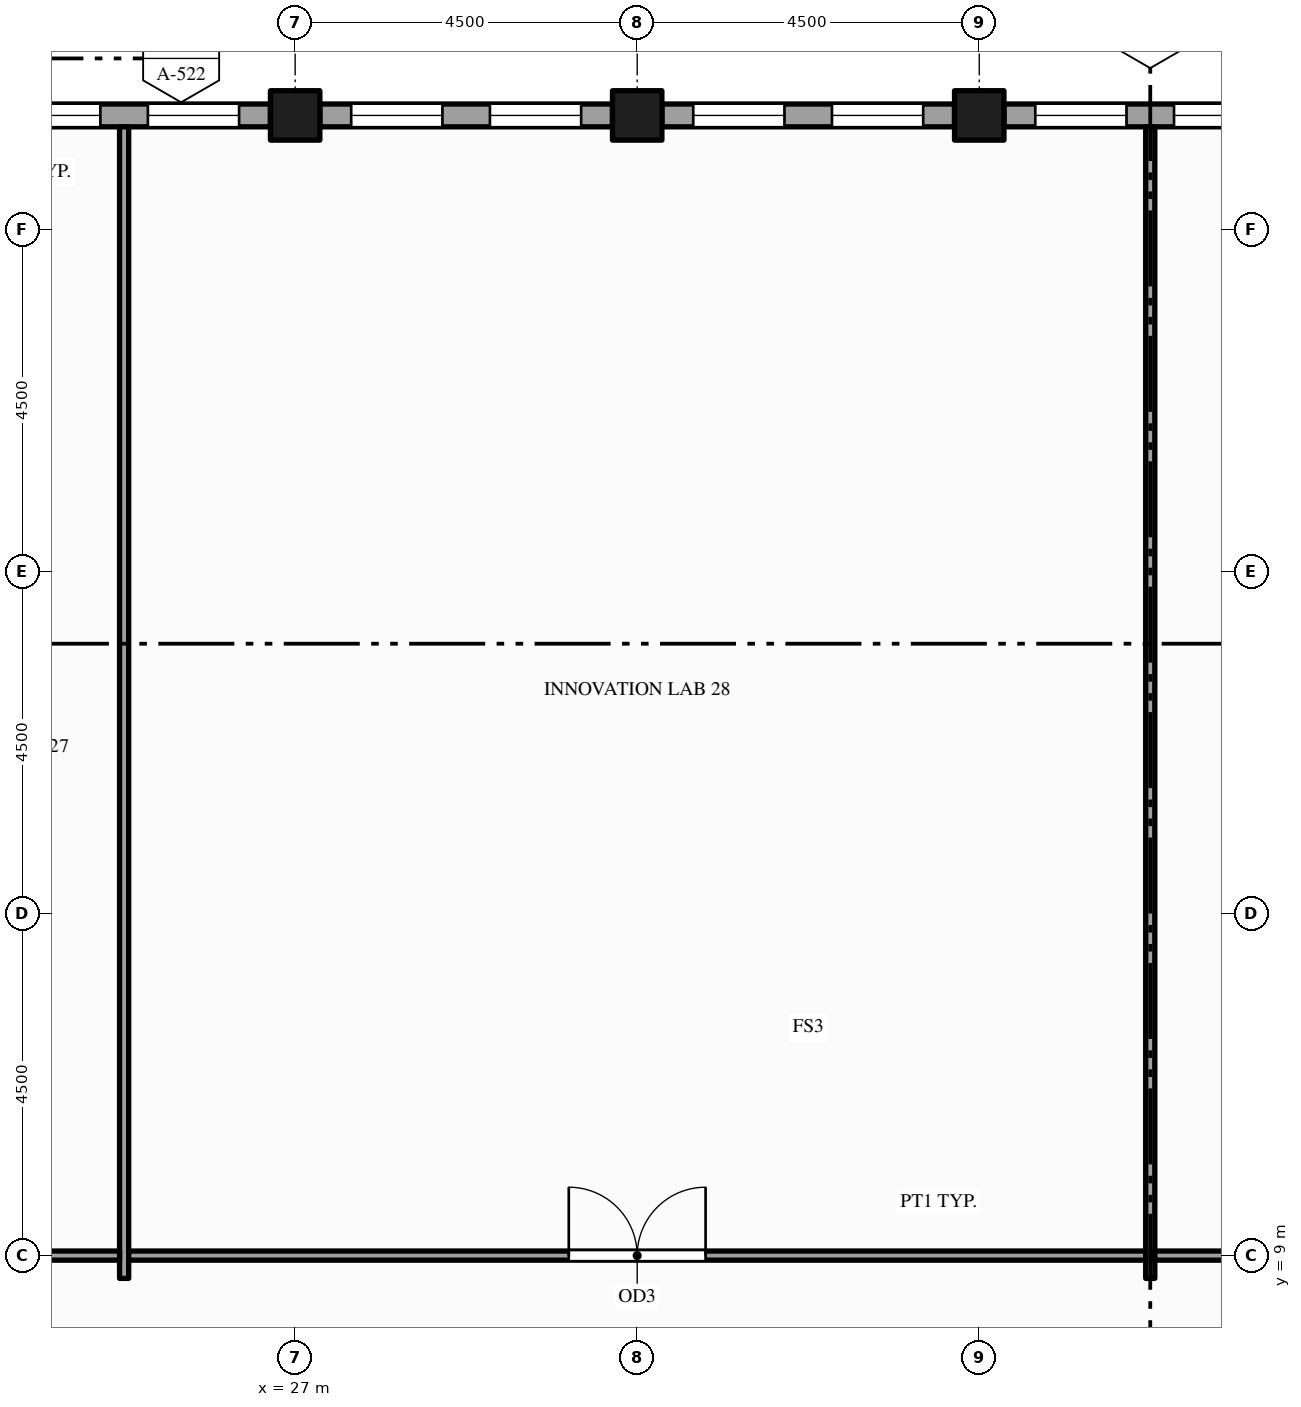
"""IFC4 building model, lengths in metres.
Left out: names, types, materials, properties, quantities, classifications, styles, units other than length and angle.
Written with IfcOpenShell. Run it as: python <this file> out.ifc"""

import sys

from ifc_helpers import new_model, si_unit, direction, frame, frame_2d, origin, origin_2d, place, context, subcontext, project, spatial, rectangle, hollow_rectangle, extrude, element, fill, save


model = new_model("IFC4")
c1 = context("Model", 3, precision=1e-05, world=origin(), true_north=direction((0.0, 1.0)))
c2 = subcontext(c1, "Body", "Model", "MODEL_VIEW")
j1 = project(units=[si_unit("LENGTHUNIT", "METRE"), si_unit("PLANEANGLEUNIT", "RADIAN")], contexts=[c1])
p1 = place(None, origin())
s1 = spatial("IfcSite", under=j1, at=p1, CompositionType="ELEMENT")
p2 = place(p1, origin())
s2 = spatial("IfcBuilding", under=s1, at=p2, CompositionType="ELEMENT")
p3 = place(p2, frame((0.0, 0.0, 273.0)))
s3 = spatial("IfcBuildingStorey", under=s2, at=p3, CompositionType="ELEMENT", Elevation=273.0)
for number, where, z_axis, x_axis in (
    (1, (27.0, 24.0, -0.15), (0.0, 0.0, 1.0), (1.0, 0.0, 0.0)),
    (2, (31.5, 24.0, -0.15), (0.0, 0.0, 1.0), (1.0, 0.0, 0.0)),
    (3, (36.0, 24.0, -0.15), (0.0, 0.0, 1.0), (1.0, 0.0, 0.0)),
):
    element("IfcColumn", number, at=place(p3, frame(where, z_axis=z_axis, x_axis=x_axis)), inside=s3, PredefinedType="COLUMN", context=c2, shape_type="SweptSolid", body=[
        extrude(hollow_rectangle(XDim=0.65, YDim=0.65, WallThickness=0.032, at=origin_2d()), origin(), (0.0, 0.0, 1.0), 4.0),
    ])
p4 = place(p3, frame((40.175, 24.0, 0.0), z_axis=(0.0, 0.0, 1.0), x_axis=(-1.0, 0.0, 0.0)))
e4 = element("IfcWall", 4, at=p4, inside=s3, PredefinedType="STANDARD", context=c2, shape_type="SweptSolid", body=[
    extrude(rectangle(XDim=3.85, YDim=0.3, at=frame_2d((1.925, 0.0))), origin(), (0.0, 0.0, 1.0), 2.87),
])
p5 = place(p4, frame((0.413, 0.0, 0.9)))
e5 = element("IfcOpeningElement", 5, at=p5, cuts=e4, PredefinedType="OPENING", context=c2, shape_type="SweptSolid", body=[
    extrude(rectangle(XDim=1.2, YDim=1.75, at=frame_2d((0.6, 0.875))), frame((0.0, 0.16, 0.0), z_axis=(0.0, -1.0, 0.0), x_axis=(1.0, 0.0, 0.0)), (0.0, 0.0, 1.0), 0.32),
])
p6 = place(p4, frame((2.238, 0.0, 0.9)))
e6 = element("IfcOpeningElement", 6, at=p6, cuts=e4, PredefinedType="OPENING", context=c2, shape_type="SweptSolid", body=[
    extrude(rectangle(XDim=1.2, YDim=1.75, at=frame_2d((0.6, 0.875))), frame((0.0, 0.16, 0.0), z_axis=(0.0, -1.0, 0.0), x_axis=(1.0, 0.0, 0.0)), (0.0, 0.0, 1.0), 0.32),
])
p7 = place(p3, frame((35.675, 24.0, 0.0), z_axis=(0.0, 0.0, 1.0), x_axis=(-1.0, 0.0, 0.0)))
e7 = element("IfcWall", 7, at=p7, inside=s3, PredefinedType="STANDARD", context=c2, shape_type="SweptSolid", body=[
    extrude(rectangle(XDim=3.85, YDim=0.3, at=frame_2d((1.925, 0.0))), origin(), (0.0, 0.0, 1.0), 2.87),
])
p8 = place(p7, frame((0.413, 0.0, 0.9)))
e8 = element("IfcOpeningElement", 8, at=p8, cuts=e7, PredefinedType="OPENING", context=c2, shape_type="SweptSolid", body=[
    extrude(rectangle(XDim=1.2, YDim=1.75, at=frame_2d((0.6, 0.875))), frame((0.0, 0.16, 0.0), z_axis=(0.0, -1.0, 0.0), x_axis=(1.0, 0.0, 0.0)), (0.0, 0.0, 1.0), 0.32),
])
p9 = place(p7, frame((2.238, 0.0, 0.9)))
e9 = element("IfcOpeningElement", 9, at=p9, cuts=e7, PredefinedType="OPENING", context=c2, shape_type="SweptSolid", body=[
    extrude(rectangle(XDim=1.2, YDim=1.75, at=frame_2d((0.6, 0.875))), frame((0.0, 0.16, 0.0), z_axis=(0.0, -1.0, 0.0), x_axis=(1.0, 0.0, 0.0)), (0.0, 0.0, 1.0), 0.32),
])
p10 = place(p3, frame((31.175, 24.0, 0.0), z_axis=(0.0, 0.0, 1.0), x_axis=(-1.0, 0.0, 0.0)))
e10 = element("IfcWall", 10, at=p10, inside=s3, PredefinedType="STANDARD", context=c2, shape_type="SweptSolid", body=[
    extrude(rectangle(XDim=3.85, YDim=0.3, at=frame_2d((1.925, 0.0))), origin(), (0.0, 0.0, 1.0), 2.87),
])
p11 = place(p10, frame((0.413, 0.0, 0.9)))
e11 = element("IfcOpeningElement", 11, at=p11, cuts=e10, PredefinedType="OPENING", context=c2, shape_type="SweptSolid", body=[
    extrude(rectangle(XDim=1.2, YDim=1.75, at=frame_2d((0.6, 0.875))), frame((0.0, 0.16, 0.0), z_axis=(0.0, -1.0, 0.0), x_axis=(1.0, 0.0, 0.0)), (0.0, 0.0, 1.0), 0.32),
])
p12 = place(p10, frame((2.238, 0.0, 0.9)))
e12 = element("IfcOpeningElement", 12, at=p12, cuts=e10, PredefinedType="OPENING", context=c2, shape_type="SweptSolid", body=[
    extrude(rectangle(XDim=1.2, YDim=1.75, at=frame_2d((0.6, 0.875))), frame((0.0, 0.16, 0.0), z_axis=(0.0, -1.0, 0.0), x_axis=(1.0, 0.0, 0.0)), (0.0, 0.0, 1.0), 0.32),
])
p13 = place(p3, frame((26.675, 24.0, 0.0), z_axis=(0.0, 0.0, 1.0), x_axis=(-1.0, 0.0, 0.0)))
e13 = element("IfcWall", 13, at=p13, inside=s3, PredefinedType="STANDARD", context=c2, shape_type="SweptSolid", body=[
    extrude(rectangle(XDim=3.85, YDim=0.3, at=frame_2d((1.925, 0.0))), origin(), (0.0, 0.0, 1.0), 2.87),
])
p14 = place(p13, frame((0.413, 0.0, 0.9)))
e14 = element("IfcOpeningElement", 14, at=p14, cuts=e13, PredefinedType="OPENING", context=c2, shape_type="SweptSolid", body=[
    extrude(rectangle(XDim=1.2, YDim=1.75, at=frame_2d((0.6, 0.875))), frame((0.0, 0.16, 0.0), z_axis=(0.0, -1.0, 0.0), x_axis=(1.0, 0.0, 0.0)), (0.0, 0.0, 1.0), 0.32),
])
p15 = place(p13, frame((2.238, 0.0, 0.9)))
e15 = element("IfcOpeningElement", 15, at=p15, cuts=e13, PredefinedType="OPENING", context=c2, shape_type="SweptSolid", body=[
    extrude(rectangle(XDim=1.2, YDim=1.75, at=frame_2d((0.6, 0.875))), frame((0.0, 0.16, 0.0), z_axis=(0.0, -1.0, 0.0), x_axis=(1.0, 0.0, 0.0)), (0.0, 0.0, 1.0), 0.32),
])
for number, where, z_axis, x_axis in (
    (16, (24.75, 8.7, 0.0), (0.0, 0.0, 1.0), (0.0, 1.0, 0.0)),
    (17, (38.25, 8.7, 0.0), (0.0, 0.0, 1.0), (0.0, 1.0, 0.0)),
):
    element("IfcWall", number, at=place(p3, frame(where, z_axis=z_axis, x_axis=x_axis)), inside=s3, PredefinedType="PARTITIONING", context=c2, shape_type="SweptSolid", body=[
        extrude(rectangle(XDim=15.15, YDim=0.12, at=frame_2d((7.575, 0.0))), origin(), (0.0, 0.0, 1.0), 2.87),
    ])
p16 = place(p3, frame((20.31, 9.0, 0.0), z_axis=(0.0, 0.0, 1.0), x_axis=(1.0, 0.0, 0.0)))
e18 = element("IfcWall", 18, at=p16, inside=s3, PredefinedType="PARTITIONING", context=c2, shape_type="SweptSolid", body=[
    extrude(rectangle(XDim=4.38, YDim=0.12, at=frame_2d((2.19, 0.0))), origin(), (0.0, 0.0, 1.0), 2.87),
])
p17 = place(p16, frame((1.69, 0.0, 0.0)))
e19 = element("IfcOpeningElement", 19, at=p17, cuts=e18, PredefinedType="OPENING", context=c2, shape_type="SweptSolid", body=[
    extrude(rectangle(XDim=1.0, YDim=2.1, at=frame_2d((0.5, 1.05))), frame((0.0, 0.07, 0.0), z_axis=(0.0, -1.0, 0.0), x_axis=(1.0, 0.0, 0.0)), (0.0, 0.0, 1.0), 0.14),
])
p18 = place(p3, frame((24.81, 9.0, 0.0), z_axis=(0.0, 0.0, 1.0), x_axis=(1.0, 0.0, 0.0)))
e20 = element("IfcWall", 20, at=p18, inside=s3, PredefinedType="PARTITIONING", context=c2, shape_type="SweptSolid", body=[
    extrude(rectangle(XDim=13.38, YDim=0.12, at=frame_2d((6.69, 0.0))), origin(), (0.0, 0.0, 1.0), 2.87),
])
p19 = place(p18, frame((5.79, 0.0, 0.0)))
e21 = element("IfcOpeningElement", 21, at=p19, cuts=e20, PredefinedType="OPENING", context=c2, shape_type="SweptSolid", body=[
    extrude(rectangle(XDim=1.8, YDim=2.1, at=frame_2d((0.9, 1.05))), frame((0.0, 0.07, 0.0), z_axis=(0.0, -1.0, 0.0), x_axis=(1.0, 0.0, 0.0)), (0.0, 0.0, 1.0), 0.14),
])
p20 = place(p3, frame((38.31, 9.0, 0.0), z_axis=(0.0, 0.0, 1.0), x_axis=(1.0, 0.0, 0.0)))
e22 = element("IfcWall", 22, at=p20, inside=s3, PredefinedType="PARTITIONING", context=c2, shape_type="SweptSolid", body=[
    extrude(rectangle(XDim=4.38, YDim=0.12, at=frame_2d((2.19, 0.0))), origin(), (0.0, 0.0, 1.0), 2.87),
])
p21 = place(p20, frame((1.74, 0.0, 0.0)))
e23 = element("IfcOpeningElement", 23, at=p21, cuts=e22, PredefinedType="OPENING", context=c2, shape_type="SweptSolid", body=[
    extrude(rectangle(XDim=0.9, YDim=2.1, at=frame_2d((0.45, 1.05))), frame((0.0, 0.07, 0.0), z_axis=(0.0, -1.0, 0.0), x_axis=(1.0, 0.0, 0.0)), (0.0, 0.0, 1.0), 0.14),
])
p22 = place(p5, origin())
e24 = element("IfcWindow", 24, at=p22, inside=s3, PartitioningType="SINGLE_PANEL", PredefinedType="WINDOW", context=c2, shape_type="SweptSolid", body=[
    extrude(rectangle(XDim=1.2, YDim=1.75, at=frame_2d((0.6, 0.875))), frame((0.0, 0.03, 0.0), z_axis=(0.0, -1.0, 0.0), x_axis=(1.0, 0.0, 0.0)), (0.0, 0.0, 1.0), 0.06),
])
fill(e5, e24)
p23 = place(p6, origin())
e25 = element("IfcWindow", 25, at=p23, inside=s3, PartitioningType="SINGLE_PANEL", PredefinedType="WINDOW", context=c2, shape_type="SweptSolid", body=[
    extrude(rectangle(XDim=1.2, YDim=1.75, at=frame_2d((0.6, 0.875))), frame((0.0, 0.03, 0.0), z_axis=(0.0, -1.0, 0.0), x_axis=(1.0, 0.0, 0.0)), (0.0, 0.0, 1.0), 0.06),
])
fill(e6, e25)
p24 = place(p8, origin())
e26 = element("IfcWindow", 26, at=p24, inside=s3, PartitioningType="SINGLE_PANEL", PredefinedType="WINDOW", context=c2, shape_type="SweptSolid", body=[
    extrude(rectangle(XDim=1.2, YDim=1.75, at=frame_2d((0.6, 0.875))), frame((0.0, 0.03, 0.0), z_axis=(0.0, -1.0, 0.0), x_axis=(1.0, 0.0, 0.0)), (0.0, 0.0, 1.0), 0.06),
])
fill(e8, e26)
p25 = place(p9, origin())
e27 = element("IfcWindow", 27, at=p25, inside=s3, PartitioningType="SINGLE_PANEL", PredefinedType="WINDOW", context=c2, shape_type="SweptSolid", body=[
    extrude(rectangle(XDim=1.2, YDim=1.75, at=frame_2d((0.6, 0.875))), frame((0.0, 0.03, 0.0), z_axis=(0.0, -1.0, 0.0), x_axis=(1.0, 0.0, 0.0)), (0.0, 0.0, 1.0), 0.06),
])
fill(e9, e27)
p26 = place(p11, origin())
e28 = element("IfcWindow", 28, at=p26, inside=s3, PartitioningType="SINGLE_PANEL", PredefinedType="WINDOW", context=c2, shape_type="SweptSolid", body=[
    extrude(rectangle(XDim=1.2, YDim=1.75, at=frame_2d((0.6, 0.875))), frame((0.0, 0.03, 0.0), z_axis=(0.0, -1.0, 0.0), x_axis=(1.0, 0.0, 0.0)), (0.0, 0.0, 1.0), 0.06),
])
fill(e11, e28)
p27 = place(p12, origin())
e29 = element("IfcWindow", 29, at=p27, inside=s3, PartitioningType="SINGLE_PANEL", PredefinedType="WINDOW", context=c2, shape_type="SweptSolid", body=[
    extrude(rectangle(XDim=1.2, YDim=1.75, at=frame_2d((0.6, 0.875))), frame((0.0, 0.03, 0.0), z_axis=(0.0, -1.0, 0.0), x_axis=(1.0, 0.0, 0.0)), (0.0, 0.0, 1.0), 0.06),
])
fill(e12, e29)
p28 = place(p14, origin())
e30 = element("IfcWindow", 30, at=p28, inside=s3, PartitioningType="SINGLE_PANEL", PredefinedType="WINDOW", context=c2, shape_type="SweptSolid", body=[
    extrude(rectangle(XDim=1.2, YDim=1.75, at=frame_2d((0.6, 0.875))), frame((0.0, 0.03, 0.0), z_axis=(0.0, -1.0, 0.0), x_axis=(1.0, 0.0, 0.0)), (0.0, 0.0, 1.0), 0.06),
])
fill(e14, e30)
p29 = place(p15, origin())
e31 = element("IfcWindow", 31, at=p29, inside=s3, PartitioningType="SINGLE_PANEL", PredefinedType="WINDOW", context=c2, shape_type="SweptSolid", body=[
    extrude(rectangle(XDim=1.2, YDim=1.75, at=frame_2d((0.6, 0.875))), frame((0.0, 0.03, 0.0), z_axis=(0.0, -1.0, 0.0), x_axis=(1.0, 0.0, 0.0)), (0.0, 0.0, 1.0), 0.06),
])
fill(e15, e31)
p30 = place(p19, origin())
e32 = element("IfcDoor", 32, at=p30, inside=s3, OperationType="DOUBLE_DOOR_SINGLE_SWING", PredefinedType="DOOR", context=c2, shape_type="SweptSolid", body=[
    extrude(rectangle(XDim=1.8, YDim=2.1, at=frame_2d((0.9, 1.05))), frame((0.0, 0.025, 0.0), z_axis=(0.0, -1.0, 0.0), x_axis=(1.0, 0.0, 0.0)), (0.0, 0.0, 1.0), 0.05),
])
fill(e21, e32)
save(model, sys.argv[1])
